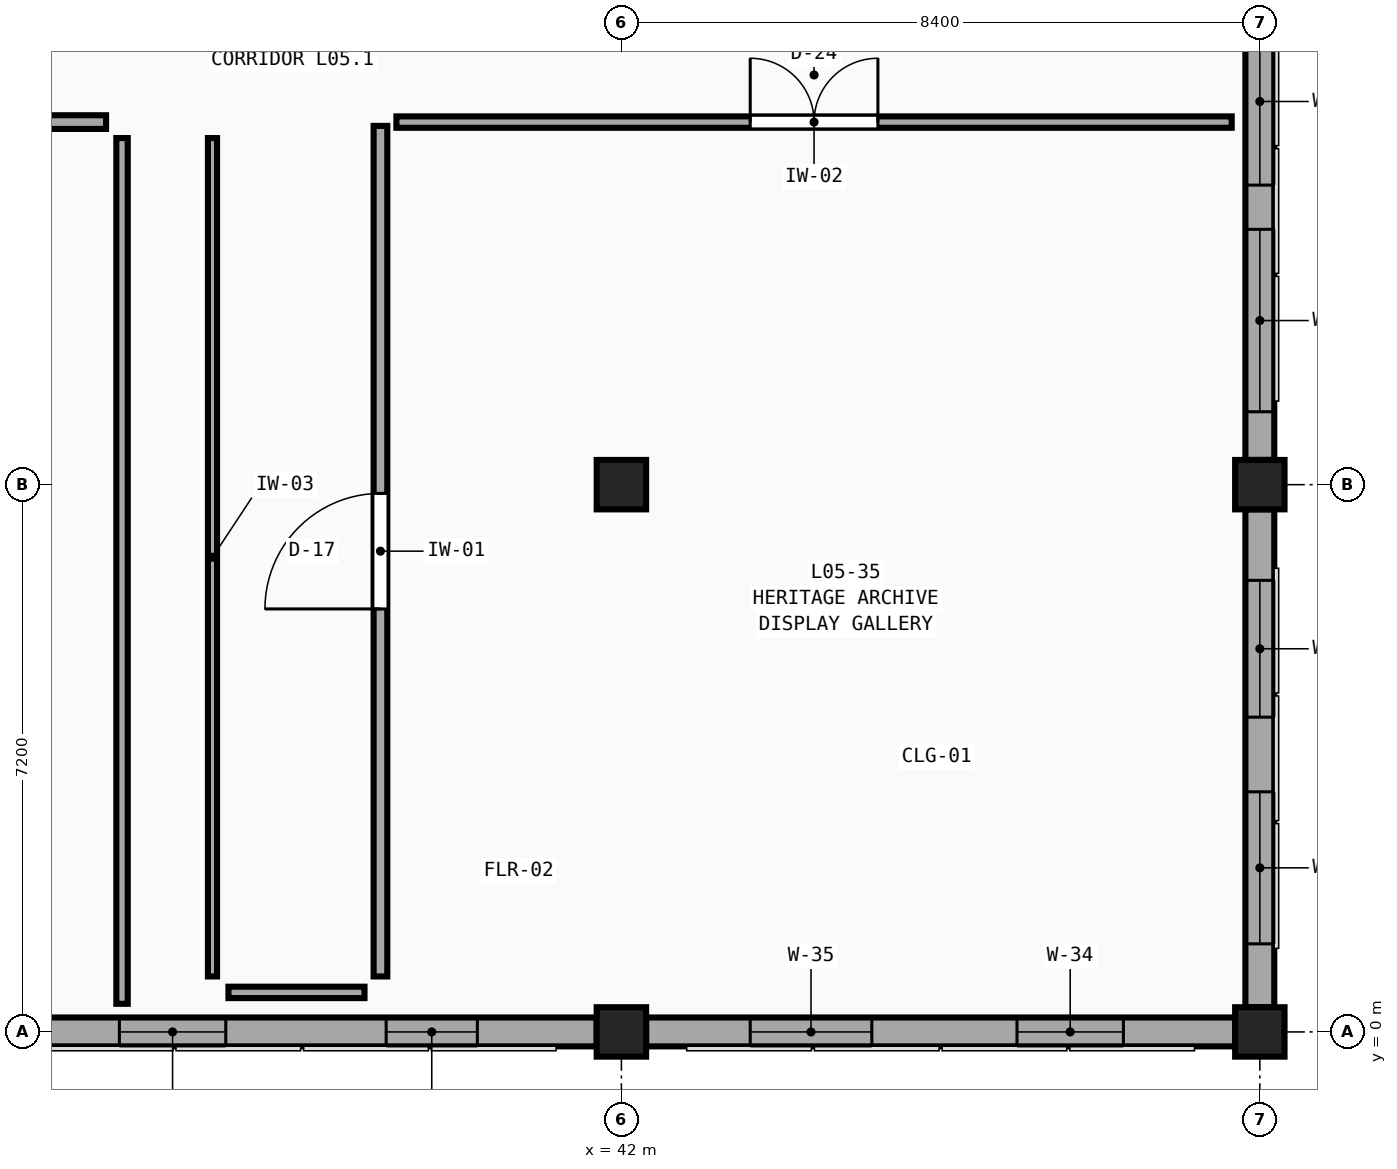
"""IFC4 building model, lengths in metres.
Left out: names, types, materials, properties, quantities, classifications, styles, units other than length and angle.
Written with IfcOpenShell. Run it as: python <this file> out.ifc"""

import sys

from ifc_helpers import new_model, si_unit, direction, frame, frame_2d, origin, origin_2d, place, context, subcontext, project, spatial, rectangle, extrude, element, fill, save


model = new_model("IFC4")
c1 = context("Model", 3, precision=1e-05, world=origin(), true_north=direction((0.0, 1.0)))
c2 = subcontext(c1, "Body", "Model", "MODEL_VIEW")
j1 = project(units=[si_unit("LENGTHUNIT", "METRE"), si_unit("PLANEANGLEUNIT", "RADIAN")], contexts=[c1])
p1 = place(None, origin())
s1 = spatial("IfcSite", under=j1, at=p1, CompositionType="ELEMENT")
p2 = place(p1, origin())
s2 = spatial("IfcBuilding", under=s1, at=p2, CompositionType="ELEMENT")
p3 = place(p2, frame((0.0, 0.0, 23.4)))
s3 = spatial("IfcBuildingStorey", under=s2, at=p3, CompositionType="ELEMENT", Elevation=23.4)
for number, where, z_axis, x_axis in (
    (1, (42.0, 0.0, 0.0), (0.0, 0.0, 1.0), (1.0, 0.0, 0.0)),
    (2, (42.0, 7.2, 0.0), (0.0, 0.0, 1.0), (1.0, 0.0, 0.0)),
    (3, (50.4, 0.0, 0.0), (0.0, 0.0, 1.0), (1.0, 0.0, 0.0)),
    (4, (50.4, 7.2, 0.0), (0.0, 0.0, 1.0), (1.0, 0.0, 0.0)),
):
    element("IfcColumn", number, at=place(p3, frame(where, z_axis=z_axis, x_axis=x_axis)), inside=s3, PredefinedType="COLUMN", context=c2, shape_type="SweptSolid", body=[
        extrude(rectangle(XDim=0.65, YDim=0.65, at=origin_2d()), origin(), (0.0, 0.0, 1.0), 4.5),
    ])
p4 = place(p3, frame((41.675, 0.0, 0.0), z_axis=(0.0, 0.0, 1.0), x_axis=(-1.0, 0.0, 0.0)))
e5 = element("IfcWall", 5, at=p4, inside=s3, PredefinedType="SOLIDWALL", context=c2, shape_type="SweptSolid", body=[
    extrude(rectangle(XDim=7.75, YDim=0.38, at=frame_2d((3.875, 0.0))), origin(), (0.0, 0.0, 1.0), 3.66),
])
p5 = place(p4, frame((1.57, 0.0, 0.75)))
e6 = element("IfcOpeningElement", 6, at=p5, cuts=e5, PredefinedType="OPENING", context=c2, shape_type="SweptSolid", body=[
    extrude(rectangle(XDim=1.2, YDim=2.44, at=frame_2d((0.6, 1.22))), frame((0.0, 0.21, 0.0), z_axis=(0.0, -1.0, 0.0), x_axis=(1.0, 0.0, 0.0)), (0.0, 0.0, 1.0), 0.42),
])
p6 = place(p4, frame((4.88, 0.0, 0.75)))
e7 = element("IfcOpeningElement", 7, at=p6, cuts=e5, PredefinedType="OPENING", context=c2, shape_type="SweptSolid", body=[
    extrude(rectangle(XDim=1.4, YDim=2.44, at=frame_2d((0.7, 1.22))), frame((0.0, 0.21, 0.0), z_axis=(0.0, -1.0, 0.0), x_axis=(1.0, 0.0, 0.0)), (0.0, 0.0, 1.0), 0.42),
])
p7 = place(p3, frame((50.075, 0.0, 0.0), z_axis=(0.0, 0.0, 1.0), x_axis=(-1.0, 0.0, 0.0)))
e8 = element("IfcWall", 8, at=p7, inside=s3, PredefinedType="SOLIDWALL", context=c2, shape_type="SweptSolid", body=[
    extrude(rectangle(XDim=7.75, YDim=0.38, at=frame_2d((3.875, 0.0))), origin(), (0.0, 0.0, 1.0), 3.66),
])
p8 = place(p7, frame((1.47, 0.0, 0.75)))
e9 = element("IfcOpeningElement", 9, at=p8, cuts=e8, PredefinedType="OPENING", context=c2, shape_type="SweptSolid", body=[
    extrude(rectangle(XDim=1.4, YDim=2.62, at=frame_2d((0.7, 1.31))), frame((0.0, 0.21, 0.0), z_axis=(0.0, -1.0, 0.0), x_axis=(1.0, 0.0, 0.0)), (0.0, 0.0, 1.0), 0.42),
])
p9 = place(p7, frame((4.78, 0.0, 0.75)))
e10 = element("IfcOpeningElement", 10, at=p9, cuts=e8, PredefinedType="OPENING", context=c2, shape_type="SweptSolid", body=[
    extrude(rectangle(XDim=1.6, YDim=2.62, at=frame_2d((0.8, 1.31))), frame((0.0, 0.21, 0.0), z_axis=(0.0, -1.0, 0.0), x_axis=(1.0, 0.0, 0.0)), (0.0, 0.0, 1.0), 0.42),
])
p10 = place(p3, frame((50.4, 6.875, 0.0), z_axis=(0.0, 0.0, 1.0), x_axis=(0.0, -1.0, 0.0)))
e11 = element("IfcWall", 11, at=p10, inside=s3, PredefinedType="SOLIDWALL", context=c2, shape_type="SweptSolid", body=[
    extrude(rectangle(XDim=6.55, YDim=0.38, at=frame_2d((3.275, 0.0))), origin(), (0.0, 0.0, 1.0), 3.66),
])
p11 = place(p10, frame((0.934, 0.0, 0.75)))
e12 = element("IfcOpeningElement", 12, at=p11, cuts=e11, PredefinedType="OPENING", context=c2, shape_type="SweptSolid", body=[
    extrude(rectangle(XDim=1.8, YDim=2.62, at=frame_2d((0.9, 1.31))), frame((0.0, 0.21, 0.0), z_axis=(0.0, -1.0, 0.0), x_axis=(1.0, 0.0, 0.0)), (0.0, 0.0, 1.0), 0.42),
])
p12 = place(p10, frame((3.716, 0.0, 0.75)))
e13 = element("IfcOpeningElement", 13, at=p12, cuts=e11, PredefinedType="OPENING", context=c2, shape_type="SweptSolid", body=[
    extrude(rectangle(XDim=2.0, YDim=2.62, at=frame_2d((1.0, 1.31))), frame((0.0, 0.21, 0.0), z_axis=(0.0, -1.0, 0.0), x_axis=(1.0, 0.0, 0.0)), (0.0, 0.0, 1.0), 0.42),
])
p13 = place(p3, frame((50.4, 14.075, 0.0), z_axis=(0.0, 0.0, 1.0), x_axis=(0.0, -1.0, 0.0)))
e14 = element("IfcWall", 14, at=p13, inside=s3, PredefinedType="SOLIDWALL", context=c2, shape_type="SweptSolid", body=[
    extrude(rectangle(XDim=6.55, YDim=0.38, at=frame_2d((3.275, 0.0))), origin(), (0.0, 0.0, 1.0), 3.66),
])
p14 = place(p13, frame((0.734, 0.0, 0.75)))
e15 = element("IfcOpeningElement", 15, at=p14, cuts=e14, PredefinedType="OPENING", context=c2, shape_type="SweptSolid", body=[
    extrude(rectangle(XDim=2.2, YDim=2.62, at=frame_2d((1.1, 1.31))), frame((0.0, 0.21, 0.0), z_axis=(0.0, -1.0, 0.0), x_axis=(1.0, 0.0, 0.0)), (0.0, 0.0, 1.0), 0.42),
])
p15 = place(p13, frame((3.516, 0.0, 0.75)))
e16 = element("IfcOpeningElement", 16, at=p15, cuts=e14, PredefinedType="OPENING", context=c2, shape_type="SweptSolid", body=[
    extrude(rectangle(XDim=2.4, YDim=2.62, at=frame_2d((1.2, 1.31))), frame((0.0, 0.21, 0.0), z_axis=(0.0, -1.0, 0.0), x_axis=(1.0, 0.0, 0.0)), (0.0, 0.0, 1.0), 0.42),
])
p16 = place(p3, frame((22.24, 11.97, 0.0), z_axis=(0.0, 0.0, 1.0), x_axis=(1.0, 0.0, 0.0)))
e17 = element("IfcWall", 17, at=p16, inside=s3, PredefinedType="PARTITIONING", context=c2, shape_type="SweptSolid", body=[
    extrude(rectangle(XDim=12.98, YDim=0.18, at=frame_2d((6.49, 0.0))), origin(), (0.0, 0.0, 1.0), 4.21),
])
p17 = place(p16, frame((5.97, 0.0, 0.0)))
e18 = element("IfcOpeningElement", 18, at=p17, cuts=e17, PredefinedType="OPENING", context=c2, shape_type="SweptSolid", body=[
    extrude(rectangle(XDim=1.04, YDim=2.21, at=frame_2d((0.52, 1.105))), frame((0.0, 0.11, 0.0), z_axis=(0.0, -1.0, 0.0), x_axis=(1.0, 0.0, 0.0)), (0.0, 0.0, 1.0), 0.22),
])
p18 = place(p3, frame((38.83, 0.73, 0.0), z_axis=(0.0, 0.0, 1.0), x_axis=(0.0, 1.0, 0.0)))
e19 = element("IfcWall", 19, at=p18, inside=s3, PredefinedType="PARTITIONING", context=c2, shape_type="SweptSolid", body=[
    extrude(rectangle(XDim=11.19, YDim=0.18, at=frame_2d((5.595, 0.0))), origin(), (0.0, 0.0, 1.0), 4.21),
])
p19 = place(p18, frame((4.835, 0.0, 0.0)))
e20 = element("IfcOpeningElement", 20, at=p19, cuts=e19, PredefinedType="OPENING", context=c2, shape_type="SweptSolid", body=[
    extrude(rectangle(XDim=1.52, YDim=2.21, at=frame_2d((0.76, 1.105))), frame((0.0, 0.11, 0.0), z_axis=(0.0, -1.0, 0.0), x_axis=(1.0, 0.0, 0.0)), (0.0, 0.0, 1.0), 0.22),
])
p20 = place(p3, frame((36.62, 0.73, 0.0), z_axis=(0.0, 0.0, 1.0), x_axis=(0.0, 1.0, 0.0)))
e21 = element("IfcWall", 21, at=p20, inside=s3, PredefinedType="PARTITIONING", context=c2, shape_type="SweptSolid", body=[
    extrude(rectangle(XDim=11.03, YDim=0.12, at=frame_2d((5.515, 0.0))), origin(), (0.0, 0.0, 1.0), 4.21),
])
p21 = place(p3, frame((39.04, 11.97, 0.0), z_axis=(0.0, 0.0, 1.0), x_axis=(1.0, 0.0, 0.0)))
e22 = element("IfcWall", 22, at=p21, inside=s3, PredefinedType="PARTITIONING", context=c2, shape_type="SweptSolid", body=[
    extrude(rectangle(XDim=10.99, YDim=0.15, at=frame_2d((5.495, 0.0))), origin(), (0.0, 0.0, 1.0), 4.21),
])
p22 = place(p21, frame((4.655, 0.0, 0.0)))
e23 = element("IfcOpeningElement", 23, at=p22, cuts=e22, PredefinedType="OPENING", context=c2, shape_type="SweptSolid", body=[
    extrude(rectangle(XDim=1.68, YDim=2.29, at=frame_2d((0.84, 1.145))), frame((0.0, 0.095, 0.0), z_axis=(0.0, -1.0, 0.0), x_axis=(1.0, 0.0, 0.0)), (0.0, 0.0, 1.0), 0.19),
])
p23 = place(p3, frame((36.83, 0.52, 0.0), z_axis=(0.0, 0.0, 1.0), x_axis=(1.0, 0.0, 0.0)))
e24 = element("IfcWall", 24, at=p23, inside=s3, PredefinedType="PARTITIONING", context=c2, shape_type="SweptSolid", body=[
    extrude(rectangle(XDim=1.79, YDim=0.15, at=frame_2d((0.895, 0.0))), origin(), (0.0, 0.0, 1.0), 3.66),
])
p24 = place(p3, frame((35.43, 0.37, 0.0), z_axis=(0.0, 0.0, 1.0), x_axis=(0.0, 1.0, 0.0)))
e25 = element("IfcWall", 25, at=p24, inside=s3, PredefinedType="PARTITIONING", context=c2, shape_type="SweptSolid", body=[
    extrude(rectangle(XDim=11.39, YDim=0.15, at=frame_2d((5.695, 0.0))), origin(), (0.0, 0.0, 1.0), 4.21),
])
p25 = place(p5, origin())
e26 = element("IfcWindow", 26, at=p25, inside=s3, PartitioningType="SINGLE_PANEL", PredefinedType="WINDOW", context=c2, shape_type="SweptSolid", body=[
    extrude(rectangle(XDim=1.2, YDim=2.44, at=frame_2d((0.6, 1.22))), frame((0.0, 0.03, 0.0), z_axis=(0.0, -1.0, 0.0), x_axis=(1.0, 0.0, 0.0)), (0.0, 0.0, 1.0), 0.06),
])
fill(e6, e26)
p26 = place(p6, origin())
e27 = element("IfcWindow", 27, at=p26, inside=s3, PartitioningType="DOUBLE_PANEL_VERTICAL", PredefinedType="WINDOW", context=c2, shape_type="SweptSolid", body=[
    extrude(rectangle(XDim=1.4, YDim=2.44, at=frame_2d((0.7, 1.22))), frame((0.0, 0.03, 0.0), z_axis=(0.0, -1.0, 0.0), x_axis=(1.0, 0.0, 0.0)), (0.0, 0.0, 1.0), 0.06),
])
fill(e7, e27)
p27 = place(p8, origin())
e28 = element("IfcWindow", 28, at=p27, inside=s3, PartitioningType="DOUBLE_PANEL_VERTICAL", PredefinedType="WINDOW", context=c2, shape_type="SweptSolid", body=[
    extrude(rectangle(XDim=1.4, YDim=2.62, at=frame_2d((0.7, 1.31))), frame((0.0, 0.03, 0.0), z_axis=(0.0, -1.0, 0.0), x_axis=(1.0, 0.0, 0.0)), (0.0, 0.0, 1.0), 0.06),
])
fill(e9, e28)
p28 = place(p9, origin())
e29 = element("IfcWindow", 29, at=p28, inside=s3, PartitioningType="DOUBLE_PANEL_VERTICAL", PredefinedType="WINDOW", context=c2, shape_type="SweptSolid", body=[
    extrude(rectangle(XDim=1.6, YDim=2.62, at=frame_2d((0.8, 1.31))), frame((0.0, 0.03, 0.0), z_axis=(0.0, -1.0, 0.0), x_axis=(1.0, 0.0, 0.0)), (0.0, 0.0, 1.0), 0.06),
])
fill(e10, e29)
p29 = place(p11, origin())
e30 = element("IfcWindow", 30, at=p29, inside=s3, PartitioningType="DOUBLE_PANEL_VERTICAL", PredefinedType="WINDOW", context=c2, shape_type="SweptSolid", body=[
    extrude(rectangle(XDim=1.8, YDim=2.62, at=frame_2d((0.9, 1.31))), frame((0.0, 0.03, 0.0), z_axis=(0.0, -1.0, 0.0), x_axis=(1.0, 0.0, 0.0)), (0.0, 0.0, 1.0), 0.06),
])
fill(e12, e30)
p30 = place(p12, origin())
e31 = element("IfcWindow", 31, at=p30, inside=s3, PartitioningType="TRIPLE_PANEL_VERTICAL", PredefinedType="WINDOW", context=c2, shape_type="SweptSolid", body=[
    extrude(rectangle(XDim=2.0, YDim=2.62, at=frame_2d((1.0, 1.31))), frame((0.0, 0.03, 0.0), z_axis=(0.0, -1.0, 0.0), x_axis=(1.0, 0.0, 0.0)), (0.0, 0.0, 1.0), 0.06),
])
fill(e13, e31)
p31 = place(p14, origin())
e32 = element("IfcWindow", 32, at=p31, inside=s3, PartitioningType="TRIPLE_PANEL_VERTICAL", PredefinedType="WINDOW", context=c2, shape_type="SweptSolid", body=[
    extrude(rectangle(XDim=2.2, YDim=2.62, at=frame_2d((1.1, 1.31))), frame((0.0, 0.03, 0.0), z_axis=(0.0, -1.0, 0.0), x_axis=(1.0, 0.0, 0.0)), (0.0, 0.0, 1.0), 0.06),
])
fill(e15, e32)
p32 = place(p15, origin())
e33 = element("IfcWindow", 33, at=p32, inside=s3, PartitioningType="TRIPLE_PANEL_VERTICAL", PredefinedType="WINDOW", context=c2, shape_type="SweptSolid", body=[
    extrude(rectangle(XDim=2.4, YDim=2.62, at=frame_2d((1.2, 1.31))), frame((0.0, 0.03, 0.0), z_axis=(0.0, -1.0, 0.0), x_axis=(1.0, 0.0, 0.0)), (0.0, 0.0, 1.0), 0.06),
])
fill(e16, e33)
p33 = place(p19, origin())
e34 = element("IfcDoor", 34, at=p33, inside=s3, OperationType="SINGLE_SWING_LEFT", PredefinedType="DOOR", context=c2, shape_type="SweptSolid", body=[
    extrude(rectangle(XDim=1.52, YDim=2.21, at=frame_2d((0.76, 1.105))), frame((0.0, 0.025, 0.0), z_axis=(0.0, -1.0, 0.0), x_axis=(1.0, 0.0, 0.0)), (0.0, 0.0, 1.0), 0.05),
])
fill(e20, e34)
p34 = place(p22, origin())
e35 = element("IfcDoor", 35, at=p34, inside=s3, OperationType="DOUBLE_DOOR_SINGLE_SWING", PredefinedType="DOOR", context=c2, shape_type="SweptSolid", body=[
    extrude(rectangle(XDim=1.68, YDim=2.29, at=frame_2d((0.84, 1.145))), frame((0.0, 0.025, 0.0), z_axis=(0.0, -1.0, 0.0), x_axis=(1.0, 0.0, 0.0)), (0.0, 0.0, 1.0), 0.05),
])
fill(e23, e35)
save(model, sys.argv[1])
